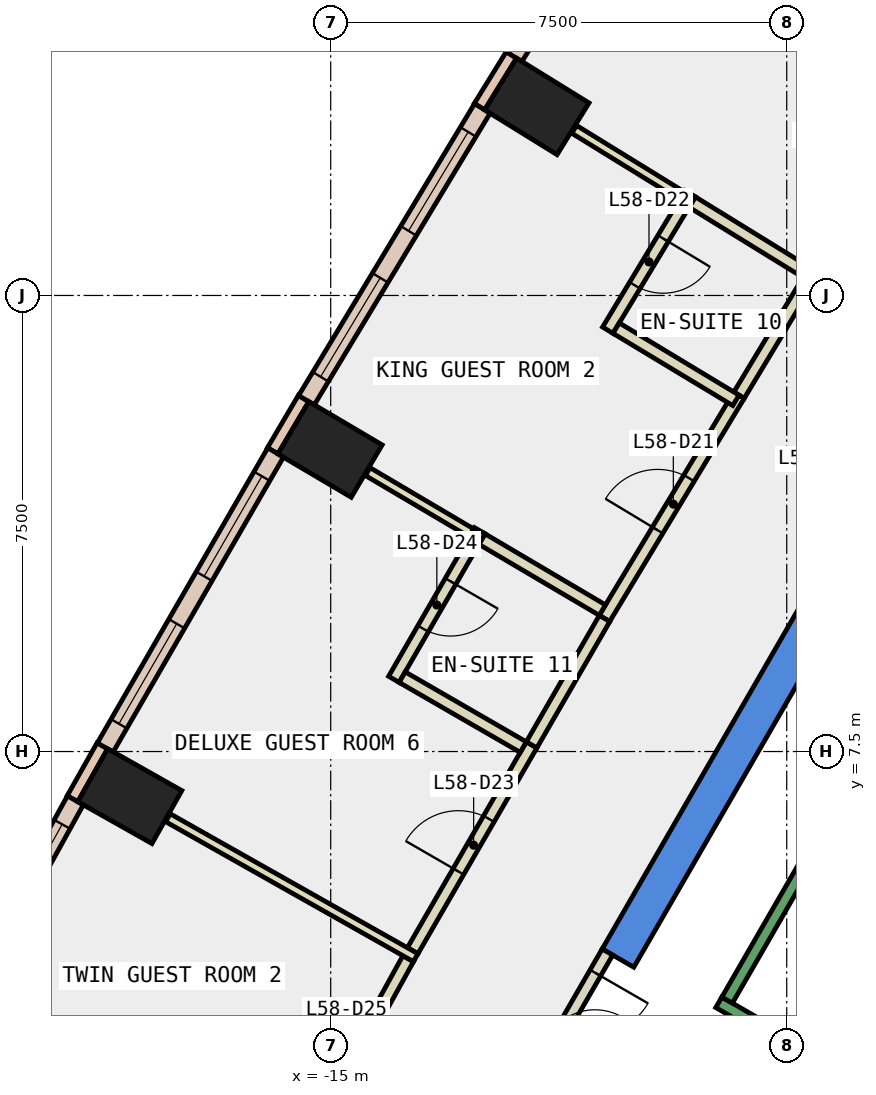
"""IFC4 building model, lengths in metres.
Left out: names, types, materials, properties, quantities, classifications, styles, units other than length and angle.
Written with IfcOpenShell. Run it as: python <this file> out.ifc"""

import sys

from ifc_helpers import new_model, si_unit, direction, frame, frame_2d, origin, origin_2d, place, context, subcontext, project, spatial, polyline, rectangle, outline, extrude, element, fill, save


model = new_model("IFC4")
c1 = context("Model", 3, precision=1e-05, world=origin(), true_north=direction((0.0, 1.0)))
c2 = subcontext(c1, "Body", "Model", "MODEL_VIEW")
j1 = project(units=[si_unit("LENGTHUNIT", "METRE"), si_unit("PLANEANGLEUNIT", "RADIAN")], contexts=[c1])
p1 = place(None, origin())
s1 = spatial("IfcSite", under=j1, at=p1, CompositionType="ELEMENT")
p2 = place(p1, origin())
s2 = spatial("IfcBuilding", under=s1, at=p2, CompositionType="ELEMENT")
p3 = place(p2, frame((0.0, 0.0, 255.8)))
s3 = spatial("IfcBuildingStorey", under=s2, at=p3, CompositionType="ELEMENT", Elevation=255.8)
for number, where, z_axis, x_axis in (
    (1, (-11.61, 18.109, -0.34), (0.0, 0.0, 1.0), (0.526, 0.851, 0.0)),
    (2, (-15.011, 12.468, -0.34), (0.0, 0.0, 1.0), (0.509, 0.861, 0.0)),
    (3, (-18.304, 6.766, -0.34), (0.0, 0.0, 1.0), (0.491, 0.871, 0.0)),
):
    element("IfcColumn", number, at=place(p3, frame(where, z_axis=z_axis, x_axis=x_axis)), inside=s3, PredefinedType="COLUMN", context=c2, shape_type="SweptSolid", body=[
        extrude(rectangle(XDim=1.0, YDim=1.4, at=origin_2d()), origin(), (0.0, 0.0, 1.0), 3.6),
    ])
p4 = place(p3, frame((0.0, 0.0, -0.34)))
e4 = element("IfcWall", 4, at=p4, inside=s3, PredefinedType="SHEAR", context=c2, shape_type="SweptSolid", body=[
    extrude(outline(polyline([(-10.535, 4.253), (-10.015, 3.953), (-5.427, 11.9), (-5.774, 12.5), (-10.535, 4.253)])), origin(), (0.0, 0.0, 1.0), 3.6),
])
p5 = place(p3, frame((-12.028, 18.955, 0.0), z_axis=(0.0, 0.0, 1.0), x_axis=(-0.525648735675, -0.850701714282, 0.0)))
e5 = element("IfcWall", 5, at=p5, inside=s3, PredefinedType="STANDARD", context=c2, shape_type="SweptSolid", body=[
    extrude(rectangle(XDim=1.0, YDim=0.2, at=frame_2d((0.5, 0.0))), origin(), (0.0, 0.0, 1.0), 3.26),
])
p6 = place(p3, frame((-15.446, 13.306, 0.0), z_axis=(0.0, 0.0, 1.0), x_axis=(-0.508268432768, -0.861198699634, 0.0)))
e6 = element("IfcWall", 6, at=p6, inside=s3, PredefinedType="STANDARD", context=c2, shape_type="SweptSolid", body=[
    extrude(rectangle(XDim=1.0, YDim=0.2, at=frame_2d((0.5, 0.0))), origin(), (0.0, 0.0, 1.0), 3.26),
])
p7 = place(p3, frame((-18.755, 7.594, 0.0), z_axis=(0.0, 0.0, 1.0), x_axis=(-0.491928603027, -0.870635543453, 0.0)))
e7 = element("IfcWall", 7, at=p7, inside=s3, PredefinedType="STANDARD", context=c2, shape_type="SweptSolid", body=[
    extrude(rectangle(XDim=1.0, YDim=0.2, at=frame_2d((0.5, 0.0))), origin(), (0.0, 0.0, 1.0), 3.26),
])
p8 = place(p3, frame((-8.981, 23.697, 0.0), z_axis=(0.0, 0.0, 1.0), x_axis=(-0.532558226688, -0.846393369059, 0.0)))
e8 = element("IfcWall", 8, at=p8, inside=s3, PredefinedType="STANDARD", context=c2, shape_type="SweptSolid", body=[
    extrude(rectangle(XDim=5.637, YDim=0.3, at=frame_2d((2.818, 0.0))), origin(), (0.0, 0.0, 1.0), 3.26),
])
p9 = place(p8, frame((0.459, 0.0, 0.9)))
e9 = element("IfcOpeningElement", 9, at=p9, cuts=e8, PredefinedType="OPENING", context=c2, shape_type="SweptSolid", body=[
    extrude(rectangle(XDim=1.9, YDim=2.0, at=frame_2d((0.95, 1.0))), frame((0.0, 0.16, 0.0), z_axis=(0.0, -1.0, 0.0), x_axis=(1.0, 0.0, 0.0)), (0.0, 0.0, 1.0), 0.32),
])
p10 = place(p8, frame((3.278, 0.0, 0.9)))
e10 = element("IfcOpeningElement", 10, at=p10, cuts=e8, PredefinedType="OPENING", context=c2, shape_type="SweptSolid", body=[
    extrude(rectangle(XDim=1.9, YDim=2.0, at=frame_2d((0.95, 1.0))), frame((0.0, 0.16, 0.0), z_axis=(0.0, -1.0, 0.0), x_axis=(1.0, 0.0, 0.0)), (0.0, 0.0, 1.0), 0.32),
])
p11 = place(p3, frame((-12.506, 18.076, 0.0), z_axis=(0.0, 0.0, 1.0), x_axis=(-0.516269519619, -0.856426169096, 0.0)))
e11 = element("IfcWall", 11, at=p11, inside=s3, PredefinedType="STANDARD", context=c2, shape_type="SweptSolid", body=[
    extrude(rectangle(XDim=5.603, YDim=0.3, at=frame_2d((2.802, 0.0))), origin(), (0.0, 0.0, 1.0), 3.26),
])
p12 = place(p11, frame((0.451, 0.0, 0.9)))
e12 = element("IfcOpeningElement", 12, at=p12, cuts=e11, PredefinedType="OPENING", context=c2, shape_type="SweptSolid", body=[
    extrude(rectangle(XDim=1.9, YDim=2.0, at=frame_2d((0.95, 1.0))), frame((0.0, 0.16, 0.0), z_axis=(0.0, -1.0, 0.0), x_axis=(1.0, 0.0, 0.0)), (0.0, 0.0, 1.0), 0.32),
])
p13 = place(p11, frame((3.253, 0.0, 0.9)))
e13 = element("IfcOpeningElement", 13, at=p13, cuts=e11, PredefinedType="OPENING", context=c2, shape_type="SweptSolid", body=[
    extrude(rectangle(XDim=1.9, YDim=2.0, at=frame_2d((0.95, 1.0))), frame((0.0, 0.16, 0.0), z_axis=(0.0, -1.0, 0.0), x_axis=(1.0, 0.0, 0.0)), (0.0, 0.0, 1.0), 0.32),
])
p14 = place(p3, frame((-15.906, 12.418, 0.0), z_axis=(0.0, 0.0, 1.0), x_axis=(-0.500089564757, -0.865973687372, 0.0)))
e14 = element("IfcWall", 14, at=p14, inside=s3, PredefinedType="STANDARD", context=c2, shape_type="SweptSolid", body=[
    extrude(rectangle(XDim=5.603, YDim=0.3, at=frame_2d((2.802, 0.0))), origin(), (0.0, 0.0, 1.0), 3.26),
])
p15 = place(p14, frame((0.451, 0.0, 0.9)))
e15 = element("IfcOpeningElement", 15, at=p15, cuts=e14, PredefinedType="OPENING", context=c2, shape_type="SweptSolid", body=[
    extrude(rectangle(XDim=1.9, YDim=2.0, at=frame_2d((0.95, 1.0))), frame((0.0, 0.16, 0.0), z_axis=(0.0, -1.0, 0.0), x_axis=(1.0, 0.0, 0.0)), (0.0, 0.0, 1.0), 0.32),
])
p16 = place(p14, frame((3.252, 0.0, 0.9)))
e16 = element("IfcOpeningElement", 16, at=p16, cuts=e14, PredefinedType="OPENING", context=c2, shape_type="SweptSolid", body=[
    extrude(rectangle(XDim=1.9, YDim=2.0, at=frame_2d((0.95, 1.0))), frame((0.0, 0.16, 0.0), z_axis=(0.0, -1.0, 0.0), x_axis=(1.0, 0.0, 0.0)), (0.0, 0.0, 1.0), 0.32),
])
p17 = place(p3, frame((-19.199, 6.697, 0.0), z_axis=(0.0, 0.0, 1.0), x_axis=(-0.483469062695, -0.875361448441, 0.0)))
e17 = element("IfcWall", 17, at=p17, inside=s3, PredefinedType="STANDARD", context=c2, shape_type="SweptSolid", body=[
    extrude(rectangle(XDim=5.601, YDim=0.3, at=frame_2d((2.801, 0.0))), origin(), (0.0, 0.0, 1.0), 3.26),
])
p18 = place(p17, frame((0.45, 0.0, 0.9)))
e18 = element("IfcOpeningElement", 18, at=p18, cuts=e17, PredefinedType="OPENING", context=c2, shape_type="SweptSolid", body=[
    extrude(rectangle(XDim=1.9, YDim=2.0, at=frame_2d((0.95, 1.0))), frame((0.0, 0.16, 0.0), z_axis=(0.0, -1.0, 0.0), x_axis=(1.0, 0.0, 0.0)), (0.0, 0.0, 1.0), 0.32),
])
p19 = place(p17, frame((3.251, 0.0, 0.9)))
e19 = element("IfcOpeningElement", 19, at=p19, cuts=e17, PredefinedType="OPENING", context=c2, shape_type="SweptSolid", body=[
    extrude(rectangle(XDim=1.9, YDim=2.0, at=frame_2d((0.95, 1.0))), frame((0.0, 0.16, 0.0), z_axis=(0.0, -1.0, 0.0), x_axis=(1.0, 0.0, 0.0)), (0.0, 0.0, 1.0), 0.32),
])
p20 = place(p3, frame((-10.498, 9.689, 0.0), z_axis=(0.0, 0.0, 1.0), x_axis=(0.516353342298, 0.856375633643, 0.0)))
e20 = element("IfcWall", 20, at=p20, inside=s3, PredefinedType="PARTITIONING", context=c2, shape_type="SweptSolid", body=[
    extrude(rectangle(XDim=4.288, YDim=0.2, at=frame_2d((2.144, 0.0))), origin(), (0.0, 0.0, 1.0), 3.26),
])
p21 = place(p20, frame((1.694, 0.0, 0.0)))
e21 = element("IfcOpeningElement", 21, at=p21, cuts=e20, PredefinedType="OPENING", context=c2, shape_type="SweptSolid", body=[
    extrude(rectangle(XDim=1.0, YDim=2.1, at=frame_2d((0.5, 1.05))), frame((0.0, 0.11, 0.0), z_axis=(0.0, -1.0, 0.0), x_axis=(1.0, 0.0, 0.0)), (0.0, 0.0, 1.0), 0.22),
])
p22 = place(p3, frame((-8.284, 13.361, 0.0), z_axis=(0.0, 0.0, 1.0), x_axis=(0.516354965559, 0.856374654893, 0.0)))
e22 = element("IfcWall", 22, at=p22, inside=s3, PredefinedType="PARTITIONING", context=c2, shape_type="SweptSolid", body=[
    extrude(rectangle(XDim=2.2, YDim=0.2, at=frame_2d((1.1, 0.0))), origin(), (0.0, 0.0, 1.0), 3.26),
])
p23 = place(p3, frame((-13.652, 4.224, 0.0), z_axis=(0.0, 0.0, 1.0), x_axis=(0.500221427001, 0.865897525097, 0.0)))
e23 = element("IfcWall", 23, at=p23, inside=s3, PredefinedType="PARTITIONING", context=c2, shape_type="SweptSolid", body=[
    extrude(rectangle(XDim=3.91, YDim=0.2, at=frame_2d((1.955, 0.0))), origin(), (0.0, 0.0, 1.0), 3.26),
])
p24 = place(p23, frame((1.505, 0.0, 0.0)))
e24 = element("IfcOpeningElement", 24, at=p24, cuts=e23, PredefinedType="OPENING", context=c2, shape_type="SweptSolid", body=[
    extrude(rectangle(XDim=1.0, YDim=2.1, at=frame_2d((0.5, 1.05))), frame((0.0, 0.11, 0.0), z_axis=(0.0, -1.0, 0.0), x_axis=(1.0, 0.0, 0.0)), (0.0, 0.0, 1.0), 0.22),
])
p25 = place(p3, frame((-11.696, 7.61, 0.0), z_axis=(0.0, 0.0, 1.0), x_axis=(0.500089422704, 0.865973769406, 0.0)))
e25 = element("IfcWall", 25, at=p25, inside=s3, PredefinedType="PARTITIONING", context=c2, shape_type="SweptSolid", body=[
    extrude(rectangle(XDim=2.399, YDim=0.2, at=frame_2d((1.2, 0.0))), origin(), (0.0, 0.0, 1.0), 3.26),
])
p26 = place(p3, frame((-15.809, 0.32, 0.0), z_axis=(0.0, 0.0, 1.0), x_axis=(0.483322920175, 0.875442148193, 0.0)))
e26 = element("IfcWall", 26, at=p26, inside=s3, PredefinedType="PARTITIONING", context=c2, shape_type="SweptSolid", body=[
    extrude(rectangle(XDim=4.31, YDim=0.2, at=frame_2d((2.155, 0.0))), origin(), (0.0, 0.0, 1.0), 3.26),
])
p27 = place(p26, frame((1.705, 0.0, 0.0)))
e27 = element("IfcOpeningElement", 27, at=p27, cuts=e26, PredefinedType="OPENING", context=c2, shape_type="SweptSolid", body=[
    extrude(rectangle(XDim=1.0, YDim=2.1, at=frame_2d((0.5, 1.05))), frame((0.0, 0.11, 0.0), z_axis=(0.0, -1.0, 0.0), x_axis=(1.0, 0.0, 0.0)), (0.0, 0.0, 1.0), 0.22),
])
p28 = place(p3, frame((-7.357, 19.423, 0.0), z_axis=(0.0, 0.0, 1.0), x_axis=(0.846270070045, -0.532754135176, 0.0)))
e28 = element("IfcWall", 28, at=p28, inside=s3, PredefinedType="PARTITIONING", context=c2, shape_type="SweptSolid", body=[
    extrude(rectangle(XDim=2.3, YDim=0.2, at=frame_2d((1.15, 0.0))), origin(), (0.0, 0.0, 1.0), 3.26),
])
p29 = place(p3, frame((-9.225, 16.641, 0.0), z_axis=(0.0, 0.0, 1.0), x_axis=(-0.85144868382, 0.524437926566, 0.0)))
e29 = element("IfcWall", 29, at=p29, inside=s3, PredefinedType="PARTITIONING", context=c2, shape_type="SweptSolid", body=[
    extrude(rectangle(XDim=2.08, YDim=0.15, at=frame_2d((1.04, 0.0))), origin(), (0.0, 0.0, 1.0), 3.26),
])
p30 = place(p3, frame((-7.182, 15.383, 0.0), z_axis=(0.0, 0.0, 1.0), x_axis=(-0.851498142432, 0.524357619792, 0.0)))
e30 = element("IfcWall", 30, at=p30, inside=s3, PredefinedType="PARTITIONING", context=c2, shape_type="SweptSolid", body=[
    extrude(rectangle(XDim=2.198, YDim=0.2, at=frame_2d((1.099, 0.0))), origin(), (0.0, 0.0, 1.0), 3.26),
])
p31 = place(p3, frame((-9.088, 16.674, 0.0), z_axis=(0.0, 0.0, 1.0), x_axis=(-0.516780274192, -0.856118069081, 0.0)))
e31 = element("IfcWall", 31, at=p31, inside=s3, PredefinedType="PARTITIONING", context=c2, shape_type="SweptSolid", body=[
    extrude(rectangle(XDim=2.623, YDim=0.2, at=frame_2d((1.311, 0.0))), origin(), (0.0, 0.0, 1.0), 3.26),
])
p32 = place(p31, frame((0.861, 0.0, 0.0)))
e32 = element("IfcOpeningElement", 32, at=p32, cuts=e31, PredefinedType="OPENING", context=c2, shape_type="SweptSolid", body=[
    extrude(rectangle(XDim=0.9, YDim=2.1, at=frame_2d((0.45, 1.05))), frame((0.0, 0.11, 0.0), z_axis=(0.0, -1.0, 0.0), x_axis=(1.0, 0.0, 0.0)), (0.0, 0.0, 1.0), 0.22),
])
p33 = place(p3, frame((-10.306, 14.463, 0.0), z_axis=(0.0, 0.0, 1.0), x_axis=(0.856338986581, -0.51641411683, 0.0)))
e33 = element("IfcWall", 33, at=p33, inside=s3, PredefinedType="PARTITIONING", context=c2, shape_type="SweptSolid", body=[
    extrude(rectangle(XDim=2.301, YDim=0.2, at=frame_2d((1.15, 0.0))), origin(), (0.0, 0.0, 1.0), 3.26),
])
p34 = place(p3, frame((-12.685, 11.096, 0.0), z_axis=(0.0, 0.0, 1.0), x_axis=(-0.861157054724, 0.508338988371, 0.0)))
e34 = element("IfcWall", 34, at=p34, inside=s3, PredefinedType="PARTITIONING", context=c2, shape_type="SweptSolid", body=[
    extrude(rectangle(XDim=1.981, YDim=0.15, at=frame_2d((0.991, 0.0))), origin(), (0.0, 0.0, 1.0), 3.26),
])
p35 = place(p3, frame((-10.532, 9.826, 0.0), z_axis=(0.0, 0.0, 1.0), x_axis=(-0.861311086958, 0.508077958077, 0.0)))
e35 = element("IfcWall", 35, at=p35, inside=s3, PredefinedType="PARTITIONING", context=c2, shape_type="SweptSolid", body=[
    extrude(rectangle(XDim=2.299, YDim=0.2, at=frame_2d((1.149, 0.0))), origin(), (0.0, 0.0, 1.0), 3.26),
])
p36 = place(p3, frame((-12.548, 11.132, 0.0), z_axis=(0.0, 0.0, 1.0), x_axis=(-0.500313606915, -0.865844267022, 0.0)))
e36 = element("IfcWall", 36, at=p36, inside=s3, PredefinedType="PARTITIONING", context=c2, shape_type="SweptSolid", body=[
    extrude(rectangle(XDim=2.824, YDim=0.2, at=frame_2d((1.412, 0.0))), origin(), (0.0, 0.0, 1.0), 3.26),
])
p37 = place(p36, frame((0.962, 0.0, 0.0)))
e37 = element("IfcOpeningElement", 37, at=p37, cuts=e36, PredefinedType="OPENING", context=c2, shape_type="SweptSolid", body=[
    extrude(rectangle(XDim=0.9, YDim=2.1, at=frame_2d((0.45, 1.05))), frame((0.0, 0.11, 0.0), z_axis=(0.0, -1.0, 0.0), x_axis=(1.0, 0.0, 0.0)), (0.0, 0.0, 1.0), 0.22),
])
p38 = place(p3, frame((-13.825, 8.723, 0.0), z_axis=(0.0, 0.0, 1.0), x_axis=(0.866053019151, -0.499952165731, 0.0)))
e38 = element("IfcWall", 38, at=p38, inside=s3, PredefinedType="PARTITIONING", context=c2, shape_type="SweptSolid", body=[
    extrude(rectangle(XDim=2.3, YDim=0.2, at=frame_2d((1.15, 0.0))), origin(), (0.0, 0.0, 1.0), 3.26),
])
p39 = place(p3, frame((-13.602, 4.11, 0.0), z_axis=(0.0, 0.0, 1.0), x_axis=(-0.870787203306, 0.491660092502, 0.0)))
e39 = element("IfcWall", 39, at=p39, inside=s3, PredefinedType="PARTITIONING", context=c2, shape_type="SweptSolid", body=[
    extrude(rectangle(XDim=4.68, YDim=0.15, at=frame_2d((2.34, 0.0))), origin(), (0.0, 0.0, 1.0), 3.26),
])
p40 = place(p3, frame((-10.449, 4.203, 0.0), z_axis=(0.0, 0.0, 1.0), x_axis=(-0.499914839587, -0.866074565589, 0.0)))
e40 = element("IfcWall", 40, at=p40, inside=s3, PredefinedType="PARTITIONING", context=c2, shape_type="SweptSolid", body=[
    extrude(rectangle(XDim=1.794, YDim=0.2, at=frame_2d((0.897, 0.0))), origin(), (0.0, 0.0, 1.0), 2.4),
])
p41 = place(p40, frame((0.397, 0.0, 0.0)))
e41 = element("IfcOpeningElement", 41, at=p41, cuts=e40, PredefinedType="OPENING", context=c2, shape_type="SweptSolid", body=[
    extrude(rectangle(XDim=1.0, YDim=2.1, at=frame_2d((0.5, 1.05))), frame((0.0, 0.11, 0.0), z_axis=(0.0, -1.0, 0.0), x_axis=(1.0, 0.0, 0.0)), (0.0, 0.0, 1.0), 0.22),
])
p42 = place(p3, frame((-6.25, 2.01, 0.0), z_axis=(0.0, 0.0, 1.0), x_axis=(-0.86611865017, 0.499838457731, 0.0)))
e42 = element("IfcWall", 42, at=p42, inside=s3, PredefinedType="STANDARD", context=c2, shape_type="SweptSolid", body=[
    extrude(rectangle(XDim=2.733, YDim=0.2, at=frame_2d((1.366, 0.0))), origin(), (0.0, 0.0, 1.0), 3.26),
])
p43 = place(p3, frame((-5.03, 9.388, 0.0), z_axis=(0.0, 0.0, 1.0), x_axis=(-0.499978703459, -0.866037698999, 0.0)))
e43 = element("IfcWall", 43, at=p43, inside=s3, PredefinedType="STANDARD", context=c2, shape_type="SweptSolid", body=[
    extrude(rectangle(XDim=6.9, YDim=0.2, at=frame_2d((3.45, 0.0))), origin(), (0.0, 0.0, 1.0), 3.26),
])
p44 = place(p12, origin())
e44 = element("IfcWindow", 44, at=p44, inside=s3, PartitioningType="SINGLE_PANEL", PredefinedType="WINDOW", context=c2, shape_type="SweptSolid", body=[
    extrude(rectangle(XDim=1.9, YDim=2.0, at=frame_2d((0.95, 1.0))), frame((0.0, 0.03, 0.0), z_axis=(0.0, -1.0, 0.0), x_axis=(1.0, 0.0, 0.0)), (0.0, 0.0, 1.0), 0.06),
])
fill(e12, e44)
p45 = place(p13, origin())
e45 = element("IfcWindow", 45, at=p45, inside=s3, PartitioningType="SINGLE_PANEL", PredefinedType="WINDOW", context=c2, shape_type="SweptSolid", body=[
    extrude(rectangle(XDim=1.9, YDim=2.0, at=frame_2d((0.95, 1.0))), frame((0.0, 0.03, 0.0), z_axis=(0.0, -1.0, 0.0), x_axis=(1.0, 0.0, 0.0)), (0.0, 0.0, 1.0), 0.06),
])
fill(e13, e45)
p46 = place(p15, origin())
e46 = element("IfcWindow", 46, at=p46, inside=s3, PartitioningType="SINGLE_PANEL", PredefinedType="WINDOW", context=c2, shape_type="SweptSolid", body=[
    extrude(rectangle(XDim=1.9, YDim=2.0, at=frame_2d((0.95, 1.0))), frame((0.0, 0.03, 0.0), z_axis=(0.0, -1.0, 0.0), x_axis=(1.0, 0.0, 0.0)), (0.0, 0.0, 1.0), 0.06),
])
fill(e15, e46)
p47 = place(p16, origin())
e47 = element("IfcWindow", 47, at=p47, inside=s3, PartitioningType="SINGLE_PANEL", PredefinedType="WINDOW", context=c2, shape_type="SweptSolid", body=[
    extrude(rectangle(XDim=1.9, YDim=2.0, at=frame_2d((0.95, 1.0))), frame((0.0, 0.03, 0.0), z_axis=(0.0, -1.0, 0.0), x_axis=(1.0, 0.0, 0.0)), (0.0, 0.0, 1.0), 0.06),
])
fill(e16, e47)
p48 = place(p18, origin())
e48 = element("IfcWindow", 48, at=p48, inside=s3, PartitioningType="SINGLE_PANEL", PredefinedType="WINDOW", context=c2, shape_type="SweptSolid", body=[
    extrude(rectangle(XDim=1.9, YDim=2.0, at=frame_2d((0.95, 1.0))), frame((0.0, 0.03, 0.0), z_axis=(0.0, -1.0, 0.0), x_axis=(1.0, 0.0, 0.0)), (0.0, 0.0, 1.0), 0.06),
])
fill(e18, e48)
p49 = place(p21, origin())
e49 = element("IfcDoor", 49, at=p49, inside=s3, OperationType="SINGLE_SWING_RIGHT", PredefinedType="DOOR", context=c2, shape_type="SweptSolid", body=[
    extrude(rectangle(XDim=1.0, YDim=2.1, at=frame_2d((0.5, 1.05))), frame((0.0, 0.025, 0.0), z_axis=(0.0, -1.0, 0.0), x_axis=(1.0, 0.0, 0.0)), (0.0, 0.0, 1.0), 0.05),
])
fill(e21, e49)
p50 = place(p32, origin())
e50 = element("IfcDoor", 50, at=p50, inside=s3, OperationType="SINGLE_SWING_LEFT", PredefinedType="DOOR", context=c2, shape_type="SweptSolid", body=[
    extrude(rectangle(XDim=0.9, YDim=2.1, at=frame_2d((0.45, 1.05))), frame((0.0, 0.025, 0.0), z_axis=(0.0, -1.0, 0.0), x_axis=(1.0, 0.0, 0.0)), (0.0, 0.0, 1.0), 0.05),
])
fill(e32, e50)
p51 = place(p24, origin())
e51 = element("IfcDoor", 51, at=p51, inside=s3, OperationType="SINGLE_SWING_RIGHT", PredefinedType="DOOR", context=c2, shape_type="SweptSolid", body=[
    extrude(rectangle(XDim=1.0, YDim=2.1, at=frame_2d((0.5, 1.05))), frame((0.0, 0.025, 0.0), z_axis=(0.0, -1.0, 0.0), x_axis=(1.0, 0.0, 0.0)), (0.0, 0.0, 1.0), 0.05),
])
fill(e24, e51)
p52 = place(p37, origin())
e52 = element("IfcDoor", 52, at=p52, inside=s3, OperationType="SINGLE_SWING_LEFT", PredefinedType="DOOR", context=c2, shape_type="SweptSolid", body=[
    extrude(rectangle(XDim=0.9, YDim=2.1, at=frame_2d((0.45, 1.05))), frame((0.0, 0.025, 0.0), z_axis=(0.0, -1.0, 0.0), x_axis=(1.0, 0.0, 0.0)), (0.0, 0.0, 1.0), 0.05),
])
fill(e37, e52)
p53 = place(p41, origin())
e53 = element("IfcDoor", 53, at=p53, inside=s3, OperationType="SINGLE_SWING_LEFT", PredefinedType="DOOR", context=c2, shape_type="SweptSolid", body=[
    extrude(rectangle(XDim=1.0, YDim=2.1, at=frame_2d((0.5, 1.05))), frame((0.0, 0.025, 0.0), z_axis=(0.0, -1.0, 0.0), x_axis=(1.0, 0.0, 0.0)), (0.0, 0.0, 1.0), 0.05),
])
fill(e41, e53)
save(model, sys.argv[1])
